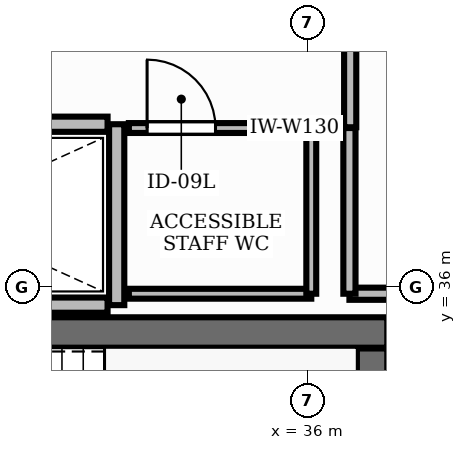
"""IFC4 building model, lengths in metres.
Left out: names, types, materials, properties, quantities, classifications, styles, units other than length and angle.
Written with IfcOpenShell. Run it as: python <this file> out.ifc"""

import sys

from ifc_helpers import new_model, si_unit, direction, frame, frame_2d, origin, place, context, subcontext, project, spatial, rectangle, extrude, element, fill, save


model = new_model("IFC4")
c1 = context("Model", 3, precision=1e-05, world=origin(), true_north=direction((0.0, 1.0)))
c2 = subcontext(c1, "Body", "Model", "MODEL_VIEW")
j1 = project(units=[si_unit("LENGTHUNIT", "METRE"), si_unit("PLANEANGLEUNIT", "RADIAN")], contexts=[c1])
p1 = place(None, origin())
s1 = spatial("IfcSite", under=j1, at=p1, CompositionType="ELEMENT")
p2 = place(p1, origin())
s2 = spatial("IfcBuilding", under=s1, at=p2, CompositionType="ELEMENT")
p3 = place(p2, frame((0.0, 0.0, 175.2)))
s3 = spatial("IfcBuildingStorey", under=s2, at=p3, CompositionType="ELEMENT", Elevation=175.2)
p4 = place(p3, frame((28.852, 35.4, 0.0), z_axis=(0.0, 0.0, 1.0), x_axis=(1.0, 0.0, 0.0)))
e1 = element("IfcWall", 1, at=p4, inside=s3, PredefinedType="SHEAR", context=c2, shape_type="SweptSolid", body=[
    extrude(rectangle(XDim=8.198, YDim=0.4, at=frame_2d((4.099, 0.0))), origin(), (0.0, 0.0, 1.0), 3.9),
])
p5 = place(p3, frame((36.85, 32.11, 0.0), z_axis=(0.0, 0.0, 1.0), x_axis=(0.0, 1.0, 0.0)))
e2 = element("IfcWall", 2, at=p5, inside=s3, PredefinedType="SHEAR", context=c2, shape_type="SweptSolid", body=[
    extrude(rectangle(XDim=3.08, YDim=0.4, at=frame_2d((1.54, 0.0))), origin(), (0.0, 0.0, 1.0), 3.9),
])
p6 = place(p3, frame((33.49, 35.76, 0.0), z_axis=(0.0, 0.0, 1.0), x_axis=(0.0, 1.0, 0.0)))
e3 = element("IfcWall", 3, at=p6, inside=s3, PredefinedType="PARTITIONING", context=c2, shape_type="SweptSolid", body=[
    extrude(rectangle(XDim=2.38, YDim=0.2, at=frame_2d((1.19, 0.0))), origin(), (0.0, 0.0, 1.0), 2.91),
])
for number, where, z_axis, x_axis in (
    (4, (28.8, 35.76, 0.0), (0.0, 0.0, 1.0), (1.0, 0.0, 0.0)),
    (5, (28.8, 38.14, 0.0), (0.0, 0.0, 1.0), (1.0, 0.0, 0.0)),
):
    element("IfcWall", number, at=place(p3, frame(where, z_axis=z_axis, x_axis=x_axis)), inside=s3, PredefinedType="PARTITIONING", context=c2, shape_type="SweptSolid", body=[
        extrude(rectangle(XDim=4.57, YDim=0.2, at=frame_2d((2.285, 0.0))), origin(), (0.0, 0.0, 1.0), 2.91),
    ])
p7 = place(p3, frame((33.65, 38.09, 0.0), z_axis=(0.0, 0.0, 1.0), x_axis=(1.0, 0.0, 0.0)))
e6 = element("IfcWall", 6, at=p7, inside=s3, PredefinedType="PARTITIONING", context=c2, shape_type="SweptSolid", body=[
    extrude(rectangle(XDim=2.4, YDim=0.13, at=frame_2d((1.2, 0.0))), origin(), (0.0, 0.0, 1.0), 2.91),
])
p8 = place(p7, frame((0.24, 0.0, 0.0)))
e7 = element("IfcOpeningElement", 7, at=p8, cuts=e6, PredefinedType="OPENING", context=c2, shape_type="SweptSolid", body=[
    extrude(rectangle(XDim=0.9, YDim=2.15, at=frame_2d((0.45, 1.075))), frame((0.0, 0.08, 0.0), z_axis=(0.0, -1.0, 0.0), x_axis=(1.0, 0.0, 0.0)), (0.0, 0.0, 1.0), 0.16),
])
p9 = place(p3, frame((36.05, 35.91, 0.0), z_axis=(0.0, 0.0, 1.0), x_axis=(-1.0, 0.0, 0.0)))
e8 = element("IfcWall", 8, at=p9, inside=s3, PredefinedType="PARTITIONING", context=c2, shape_type="SweptSolid", body=[
    extrude(rectangle(XDim=2.4, YDim=0.13, at=frame_2d((1.2, 0.0))), origin(), (0.0, 0.0, 1.0), 2.91),
])
p10 = place(p3, frame((36.05, 38.09, 0.0), z_axis=(0.0, 0.0, 1.0), x_axis=(0.0, -1.0, 0.0)))
e9 = element("IfcWall", 9, at=p10, inside=s3, PredefinedType="PARTITIONING", context=c2, shape_type="SweptSolid", body=[
    extrude(rectangle(XDim=2.18, YDim=0.13, at=frame_2d((1.09, 0.0))), origin(), (0.0, 0.0, 1.0), 2.91),
])
p11 = place(p3, frame((37.35, 35.91, 0.0), z_axis=(0.0, 0.0, 1.0), x_axis=(-1.0, 0.0, 0.0)))
e10 = element("IfcWall", 10, at=p11, inside=s3, PredefinedType="PARTITIONING", context=c2, shape_type="SweptSolid", body=[
    extrude(rectangle(XDim=0.798, YDim=0.16, at=frame_2d((0.399, 0.0))), origin(), (0.0, 0.0, 1.0), 2.91),
])
p12 = place(p3, frame((36.552, 35.91, 0.0), z_axis=(0.0, 0.0, 1.0), x_axis=(0.0, 1.0, 0.0)))
e11 = element("IfcWall", 11, at=p12, inside=s3, PredefinedType="PARTITIONING", context=c2, shape_type="SweptSolid", body=[
    extrude(rectangle(XDim=2.18, YDim=0.16, at=frame_2d((1.09, 0.0))), origin(), (0.0, 0.0, 1.0), 2.91),
])
p13 = place(p3, frame((36.562, 38.1, 0.0), z_axis=(0.0, 0.0, 1.0), x_axis=(0.0, 1.0, 0.0)))
e12 = element("IfcWall", 12, at=p13, inside=s3, PredefinedType="PARTITIONING", context=c2, shape_type="SweptSolid", body=[
    extrude(rectangle(XDim=2.55, YDim=0.16, at=frame_2d((1.275, 0.0))), origin(), (0.0, 0.0, 1.0), 2.91),
])
p14 = place(p8, origin())
e13 = element("IfcDoor", 13, at=p14, inside=s3, OperationType="SINGLE_SWING_LEFT", PredefinedType="DOOR", context=c2, shape_type="SweptSolid", body=[
    extrude(rectangle(XDim=0.9, YDim=2.15, at=frame_2d((0.45, 1.075))), frame((0.0, 0.025, 0.0), z_axis=(0.0, -1.0, 0.0), x_axis=(1.0, 0.0, 0.0)), (0.0, 0.0, 1.0), 0.05),
])
fill(e7, e13)
save(model, sys.argv[1])
